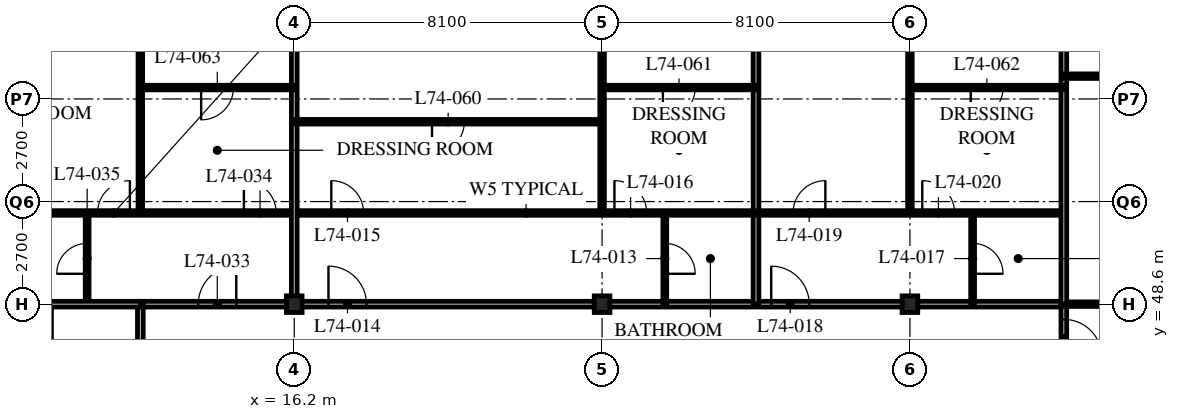
"""IFC4 building model, lengths in metres.
Left out: names, types, materials, properties, quantities, classifications, styles, units other than length and angle.
Written with IfcOpenShell. Run it as: python <this file> out.ifc"""

import sys

from ifc_helpers import new_model, si_unit, direction, frame, frame_2d, origin, origin_2d, place, context, subcontext, project, spatial, rectangle, i_section, extrude, element, fill, save


model = new_model("IFC4")
c1 = context("Model", 3, precision=1e-05, world=origin(), true_north=direction((0.0, 1.0)))
c2 = subcontext(c1, "Body", "Model", "MODEL_VIEW")
j1 = project(units=[si_unit("LENGTHUNIT", "METRE"), si_unit("PLANEANGLEUNIT", "RADIAN")], contexts=[c1])
p1 = place(None, origin())
s1 = spatial("IfcSite", under=j1, at=p1, CompositionType="ELEMENT")
p2 = place(p1, origin())
s2 = spatial("IfcBuilding", under=s1, at=p2, CompositionType="ELEMENT")
p3 = place(p2, frame((0.0, 0.0, 289.2)))
s3 = spatial("IfcBuildingStorey", under=s2, at=p3, CompositionType="ELEMENT", Elevation=289.2)
for number, where, z_axis, x_axis in (
    (1, (16.2, 48.6, 0.0), (0.0, 0.0, 1.0), (1.0, 0.0, 0.0)),
    (2, (24.3, 48.6, 0.0), (0.0, 0.0, 1.0), (1.0, 0.0, 0.0)),
    (3, (32.4, 48.6, 0.0), (0.0, 0.0, 1.0), (1.0, 0.0, 0.0)),
):
    element("IfcColumn", number, at=place(p3, frame(where, z_axis=z_axis, x_axis=x_axis)), inside=s3, PredefinedType="COLUMN", context=c2, shape_type="SweptSolid", body=[
        extrude(i_section(OverallWidth=0.412, OverallDepth=0.437, WebThickness=0.036, FlangeThickness=0.058, FilletRadius=0.015, at=origin_2d()), origin(), (0.0, 0.0, 1.0), 3.9),
    ])
p4 = place(p3, frame((12.15, 48.6, 0.0), z_axis=(0.0, 0.0, 1.0), x_axis=(1.0, 0.0, 0.0)))
e4 = element("IfcWall", 4, at=p4, inside=s3, PredefinedType="PARTITIONING", context=c2, shape_type="SweptSolid", body=[
    extrude(rectangle(XDim=24.3, YDim=0.15, at=frame_2d((12.15, 0.0))), origin(), (0.0, 0.0, 1.0), 3.078),
])
p5 = place(p4, frame((4.95, 0.0, 0.0)))
e5 = element("IfcOpeningElement", 5, at=p5, cuts=e4, PredefinedType="OPENING", context=c2, shape_type="SweptSolid", body=[
    extrude(rectangle(XDim=1.0, YDim=2.1, at=frame_2d((0.5, 1.05))), frame((0.0, 0.085, 0.0), z_axis=(0.0, -1.0, 0.0), x_axis=(1.0, 0.0, 0.0)), (0.0, 0.0, 1.0), 0.17),
])
p6 = place(p4, frame((16.6, 0.0, 0.0)))
e6 = element("IfcOpeningElement", 6, at=p6, cuts=e4, PredefinedType="OPENING", context=c2, shape_type="SweptSolid", body=[
    extrude(rectangle(XDim=1.0, YDim=2.1, at=frame_2d((0.5, 1.05))), frame((0.0, 0.085, 0.0), z_axis=(0.0, -1.0, 0.0), x_axis=(1.0, 0.0, 0.0)), (0.0, 0.0, 1.0), 0.17),
])
p7 = place(p4, frame((1.525, 0.0, 0.0)))
e7 = element("IfcOpeningElement", 7, at=p7, cuts=e4, PredefinedType="OPENING", context=c2, shape_type="SweptSolid", body=[
    extrude(rectangle(XDim=1.0, YDim=2.1, at=frame_2d((0.5, 1.05))), frame((0.0, 0.085, 0.0), z_axis=(0.0, -1.0, 0.0), x_axis=(1.0, 0.0, 0.0)), (0.0, 0.0, 1.0), 0.17),
])
p8 = place(p3, frame((12.15, 22.5, 0.0), z_axis=(0.0, 0.0, 1.0), x_axis=(0.0, 1.0, 0.0)))
e8 = element("IfcWall", 8, at=p8, inside=s3, PredefinedType="PARTITIONING", context=c2, shape_type="SweptSolid", body=[
    extrude(rectangle(XDim=26.1, YDim=0.15, at=frame_2d((13.05, 0.0))), origin(), (0.0, 0.0, 1.0), 3.69),
])
p9 = place(p8, frame((0.4, 0.0, 0.0)))
e9 = element("IfcOpeningElement", 9, at=p9, cuts=e8, PredefinedType="OPENING", context=c2, shape_type="SweptSolid", body=[
    extrude(rectangle(XDim=1.0, YDim=2.1, at=frame_2d((0.5, 1.05))), frame((0.0, 0.085, 0.0), z_axis=(0.0, -1.0, 0.0), x_axis=(1.0, 0.0, 0.0)), (0.0, 0.0, 1.0), 0.17),
])
p10 = place(p3, frame((36.45, 46.8, 0.0), z_axis=(0.0, 0.0, 1.0), x_axis=(0.0, 1.0, 0.0)))
e10 = element("IfcWall", 10, at=p10, inside=s3, PredefinedType="PARTITIONING", context=c2, shape_type="SweptSolid", body=[
    extrude(rectangle(XDim=1.8, YDim=0.15, at=frame_2d((0.9, 0.0))), origin(), (0.0, 0.0, 1.0), 3.69),
])
p11 = place(p10, frame((0.4, 0.0, 0.0)))
e11 = element("IfcOpeningElement", 11, at=p11, cuts=e10, PredefinedType="OPENING", context=c2, shape_type="SweptSolid", body=[
    extrude(rectangle(XDim=1.0, YDim=2.1, at=frame_2d((0.5, 1.05))), frame((0.0, 0.085, 0.0), z_axis=(0.0, -1.0, 0.0), x_axis=(1.0, 0.0, 0.0)), (0.0, 0.0, 1.0), 0.17),
])
p12 = place(p3, frame((25.95, 48.6, 0.0), z_axis=(0.0, 0.0, 1.0), x_axis=(0.0, 1.0, 0.0)))
e12 = element("IfcWall", 12, at=p12, inside=s3, PredefinedType="PARTITIONING", context=c2, shape_type="SweptSolid", body=[
    extrude(rectangle(XDim=2.4, YDim=0.1, at=frame_2d((1.2, 0.0))), origin(), (0.0, 0.0, 1.0), 3.69),
])
p13 = place(p12, frame((0.8, 0.0, 0.0)))
e13 = element("IfcOpeningElement", 13, at=p13, cuts=e12, PredefinedType="OPENING", context=c2, shape_type="SweptSolid", body=[
    extrude(rectangle(XDim=0.8, YDim=2.1, at=frame_2d((0.4, 1.05))), frame((0.0, 0.06, 0.0), z_axis=(0.0, -1.0, 0.0), x_axis=(1.0, 0.0, 0.0)), (0.0, 0.0, 1.0), 0.12),
])
p14 = place(p3, frame((24.3, 51.0, 0.0), z_axis=(0.0, 0.0, 1.0), x_axis=(0.0, 1.0, 0.0)))
e14 = element("IfcWall", 14, at=p14, inside=s3, PredefinedType="PARTITIONING", context=c2, shape_type="SweptSolid", body=[
    extrude(rectangle(XDim=13.5, YDim=0.12, at=frame_2d((6.75, 0.0))), origin(), (0.0, 0.0, 1.0), 3.078),
])
p15 = place(p3, frame((28.35, 48.6, 0.0), z_axis=(0.0, 0.0, 1.0), x_axis=(0.0, 1.0, 0.0)))
e15 = element("IfcWall", 15, at=p15, inside=s3, PredefinedType="PARTITIONING", context=c2, shape_type="SweptSolid", body=[
    extrude(rectangle(XDim=15.9, YDim=0.15, at=frame_2d((7.95, 0.0))), origin(), (0.0, 0.0, 1.0), 3.69),
])
p16 = place(p3, frame((34.05, 48.6, 0.0), z_axis=(0.0, 0.0, 1.0), x_axis=(0.0, 1.0, 0.0)))
e16 = element("IfcWall", 16, at=p16, inside=s3, PredefinedType="PARTITIONING", context=c2, shape_type="SweptSolid", body=[
    extrude(rectangle(XDim=2.4, YDim=0.1, at=frame_2d((1.2, 0.0))), origin(), (0.0, 0.0, 1.0), 3.69),
])
p17 = place(p16, frame((0.8, 0.0, 0.0)))
e17 = element("IfcOpeningElement", 17, at=p17, cuts=e16, PredefinedType="OPENING", context=c2, shape_type="SweptSolid", body=[
    extrude(rectangle(XDim=0.8, YDim=2.1, at=frame_2d((0.4, 1.05))), frame((0.0, 0.06, 0.0), z_axis=(0.0, -1.0, 0.0), x_axis=(1.0, 0.0, 0.0)), (0.0, 0.0, 1.0), 0.12),
])
p18 = place(p3, frame((32.4, 51.0, 0.0), z_axis=(0.0, 0.0, 1.0), x_axis=(0.0, 1.0, 0.0)))
e18 = element("IfcWall", 18, at=p18, inside=s3, PredefinedType="PARTITIONING", context=c2, shape_type="SweptSolid", body=[
    extrude(rectangle(XDim=13.5, YDim=0.12, at=frame_2d((6.75, 0.0))), origin(), (0.0, 0.0, 1.0), 3.078),
])
p19 = place(p3, frame((10.75, 48.6, 0.0), z_axis=(0.0, 0.0, 1.0), x_axis=(0.0, 1.0, 0.0)))
e19 = element("IfcWall", 19, at=p19, inside=s3, PredefinedType="PARTITIONING", context=c2, shape_type="SweptSolid", body=[
    extrude(rectangle(XDim=2.4, YDim=0.1, at=frame_2d((1.2, 0.0))), origin(), (0.0, 0.0, 1.0), 3.69),
])
p20 = place(p19, frame((0.8, 0.0, 0.0)))
e20 = element("IfcOpeningElement", 20, at=p20, cuts=e19, PredefinedType="OPENING", context=c2, shape_type="SweptSolid", body=[
    extrude(rectangle(XDim=0.8, YDim=2.1, at=frame_2d((0.4, 1.05))), frame((0.0, 0.06, 0.0), z_axis=(0.0, -1.0, 0.0), x_axis=(1.0, 0.0, 0.0)), (0.0, 0.0, 1.0), 0.12),
])
p21 = place(p3, frame((8.15, 51.0, 0.0), z_axis=(0.0, 0.0, 1.0), x_axis=(1.0, 0.0, 0.0)))
e21 = element("IfcWall", 21, at=p21, inside=s3, PredefinedType="PARTITIONING", context=c2, shape_type="SweptSolid", body=[
    extrude(rectangle(XDim=28.3, YDim=0.12, at=frame_2d((14.15, 0.0))), origin(), (0.0, 0.0, 1.0), 3.69),
])
p22 = place(p21, frame((9.025, 0.0, 0.0)))
e22 = element("IfcOpeningElement", 22, at=p22, cuts=e21, PredefinedType="OPENING", context=c2, shape_type="SweptSolid", body=[
    extrude(rectangle(XDim=0.85, YDim=2.1, at=frame_2d((0.425, 1.05))), frame((0.0, 0.07, 0.0), z_axis=(0.0, -1.0, 0.0), x_axis=(1.0, 0.0, 0.0)), (0.0, 0.0, 1.0), 0.14),
])
p23 = place(p21, frame((16.475, 0.0, 0.0)))
e23 = element("IfcOpeningElement", 23, at=p23, cuts=e21, PredefinedType="OPENING", context=c2, shape_type="SweptSolid", body=[
    extrude(rectangle(XDim=0.85, YDim=2.1, at=frame_2d((0.425, 1.05))), frame((0.0, 0.07, 0.0), z_axis=(0.0, -1.0, 0.0), x_axis=(1.0, 0.0, 0.0)), (0.0, 0.0, 1.0), 0.14),
])
p24 = place(p21, frame((21.175, 0.0, 0.0)))
e24 = element("IfcOpeningElement", 24, at=p24, cuts=e21, PredefinedType="OPENING", context=c2, shape_type="SweptSolid", body=[
    extrude(rectangle(XDim=0.85, YDim=2.1, at=frame_2d((0.425, 1.05))), frame((0.0, 0.07, 0.0), z_axis=(0.0, -1.0, 0.0), x_axis=(1.0, 0.0, 0.0)), (0.0, 0.0, 1.0), 0.14),
])
p25 = place(p21, frame((24.575, 0.0, 0.0)))
e25 = element("IfcOpeningElement", 25, at=p25, cuts=e21, PredefinedType="OPENING", context=c2, shape_type="SweptSolid", body=[
    extrude(rectangle(XDim=0.85, YDim=2.1, at=frame_2d((0.425, 1.05))), frame((0.0, 0.07, 0.0), z_axis=(0.0, -1.0, 0.0), x_axis=(1.0, 0.0, 0.0)), (0.0, 0.0, 1.0), 0.14),
])
p26 = place(p21, frame((6.725, 0.0, 0.0)))
e26 = element("IfcOpeningElement", 26, at=p26, cuts=e21, PredefinedType="OPENING", context=c2, shape_type="SweptSolid", body=[
    extrude(rectangle(XDim=0.85, YDim=2.1, at=frame_2d((0.425, 1.05))), frame((0.0, 0.07, 0.0), z_axis=(0.0, -1.0, 0.0), x_axis=(1.0, 0.0, 0.0)), (0.0, 0.0, 1.0), 0.14),
])
p27 = place(p21, frame((2.875, 0.0, 0.0)))
e27 = element("IfcOpeningElement", 27, at=p27, cuts=e21, PredefinedType="OPENING", context=c2, shape_type="SweptSolid", body=[
    extrude(rectangle(XDim=0.85, YDim=2.1, at=frame_2d((0.425, 1.05))), frame((0.0, 0.07, 0.0), z_axis=(0.0, -1.0, 0.0), x_axis=(1.0, 0.0, 0.0)), (0.0, 0.0, 1.0), 0.14),
])
p28 = place(p3, frame((12.15, 51.0, 0.0), z_axis=(0.0, 0.0, 1.0), x_axis=(0.0, 1.0, 0.0)))
e28 = element("IfcWall", 28, at=p28, inside=s3, PredefinedType="PARTITIONING", context=c2, shape_type="SweptSolid", body=[
    extrude(rectangle(XDim=13.5, YDim=0.12, at=frame_2d((6.75, 0.0))), origin(), (0.0, 0.0, 1.0), 3.69),
])
p29 = place(p3, frame((0.3, 48.6, 0.0), z_axis=(0.0, 0.0, 1.0), x_axis=(1.0, 0.0, 0.0)))
e29 = element("IfcWall", 29, at=p29, inside=s3, PredefinedType="PARTITIONING", context=c2, shape_type="SweptSolid", body=[
    extrude(rectangle(XDim=11.85, YDim=0.15, at=frame_2d((5.925, 0.0))), origin(), (0.0, 0.0, 1.0), 3.078),
])
p30 = place(p3, frame((16.2, 48.6, 0.0), z_axis=(0.0, 0.0, 1.0), x_axis=(0.0, 1.0, 0.0)))
e30 = element("IfcWall", 30, at=p30, inside=s3, PredefinedType="PARTITIONING", context=c2, shape_type="SweptSolid", body=[
    extrude(rectangle(XDim=15.9, YDim=0.15, at=frame_2d((7.95, 0.0))), origin(), (0.0, 0.0, 1.0), 3.078),
])
p31 = place(p3, frame((36.45, 48.6, 0.0), z_axis=(0.0, 0.0, 1.0), x_axis=(1.0, 0.0, 0.0)))
e31 = element("IfcWall", 31, at=p31, inside=s3, PredefinedType="PARTITIONING", context=c2, shape_type="SweptSolid", body=[
    extrude(rectangle(XDim=6.45, YDim=0.12, at=frame_2d((3.225, 0.0))), origin(), (0.0, 0.0, 1.0), 3.078),
])
p32 = place(p31, frame((2.3, 0.0, 0.0)))
e32 = element("IfcOpeningElement", 32, at=p32, cuts=e31, PredefinedType="OPENING", context=c2, shape_type="SweptSolid", body=[
    extrude(rectangle(XDim=0.85, YDim=2.1, at=frame_2d((0.425, 1.05))), frame((0.0, 0.07, 0.0), z_axis=(0.0, -1.0, 0.0), x_axis=(1.0, 0.0, 0.0)), (0.0, 0.0, 1.0), 0.14),
])
p33 = place(p3, frame((36.45, 64.5, 0.0), z_axis=(0.0, 0.0, 1.0), x_axis=(0.0, -1.0, 0.0)))
e33 = element("IfcWall", 33, at=p33, inside=s3, PredefinedType="PARTITIONING", context=c2, shape_type="SweptSolid", body=[
    extrude(rectangle(XDim=15.9, YDim=0.15, at=frame_2d((7.95, 0.0))), origin(), (0.0, 0.0, 1.0), 3.69),
])
p34 = place(p3, frame((36.45, 54.6, 0.0), z_axis=(0.0, 0.0, 1.0), x_axis=(1.0, 0.0, 0.0)))
e34 = element("IfcWall", 34, at=p34, inside=s3, PredefinedType="PARTITIONING", context=c2, shape_type="SweptSolid", body=[
    extrude(rectangle(XDim=19.95, YDim=0.12, at=frame_2d((9.975, 0.0))), origin(), (0.0, 0.0, 1.0), 3.69),
])
p35 = place(p34, frame((1.675, 0.0, 0.0)))
e35 = element("IfcOpeningElement", 35, at=p35, cuts=e34, PredefinedType="OPENING", context=c2, shape_type="SweptSolid", body=[
    extrude(rectangle(XDim=0.85, YDim=2.1, at=frame_2d((0.425, 1.05))), frame((0.0, 0.07, 0.0), z_axis=(0.0, -1.0, 0.0), x_axis=(1.0, 0.0, 0.0)), (0.0, 0.0, 1.0), 0.14),
])
p36 = place(p3, frame((16.2, 53.4, 0.0), z_axis=(0.0, 0.0, 1.0), x_axis=(1.0, 0.0, 0.0)))
e36 = element("IfcWall", 36, at=p36, inside=s3, PredefinedType="PARTITIONING", context=c2, shape_type="SweptSolid", body=[
    extrude(rectangle(XDim=8.1, YDim=0.12, at=frame_2d((4.05, 0.0))), origin(), (0.0, 0.0, 1.0), 3.69),
])
p37 = place(p36, frame((3.625, 0.0, 0.0)))
e37 = element("IfcOpeningElement", 37, at=p37, cuts=e36, PredefinedType="OPENING", context=c2, shape_type="SweptSolid", body=[
    extrude(rectangle(XDim=0.85, YDim=2.1, at=frame_2d((0.425, 1.05))), frame((0.0, 0.07, 0.0), z_axis=(0.0, -1.0, 0.0), x_axis=(1.0, 0.0, 0.0)), (0.0, 0.0, 1.0), 0.14),
])
p38 = place(p3, frame((24.3, 54.3, 0.0), z_axis=(0.0, 0.0, 1.0), x_axis=(1.0, 0.0, 0.0)))
e38 = element("IfcWall", 38, at=p38, inside=s3, PredefinedType="PARTITIONING", context=c2, shape_type="SweptSolid", body=[
    extrude(rectangle(XDim=4.05, YDim=0.12, at=frame_2d((2.025, 0.0))), origin(), (0.0, 0.0, 1.0), 3.69),
])
p39 = place(p38, frame((1.6, 0.0, 0.0)))
e39 = element("IfcOpeningElement", 39, at=p39, cuts=e38, PredefinedType="OPENING", context=c2, shape_type="SweptSolid", body=[
    extrude(rectangle(XDim=0.85, YDim=2.1, at=frame_2d((0.425, 1.05))), frame((0.0, 0.07, 0.0), z_axis=(0.0, -1.0, 0.0), x_axis=(1.0, 0.0, 0.0)), (0.0, 0.0, 1.0), 0.14),
])
p40 = place(p3, frame((32.4, 54.3, 0.0), z_axis=(0.0, 0.0, 1.0), x_axis=(1.0, 0.0, 0.0)))
e40 = element("IfcWall", 40, at=p40, inside=s3, PredefinedType="PARTITIONING", context=c2, shape_type="SweptSolid", body=[
    extrude(rectangle(XDim=4.05, YDim=0.12, at=frame_2d((2.025, 0.0))), origin(), (0.0, 0.0, 1.0), 3.69),
])
p41 = place(p40, frame((1.6, 0.0, 0.0)))
e41 = element("IfcOpeningElement", 41, at=p41, cuts=e40, PredefinedType="OPENING", context=c2, shape_type="SweptSolid", body=[
    extrude(rectangle(XDim=0.85, YDim=2.1, at=frame_2d((0.425, 1.05))), frame((0.0, 0.07, 0.0), z_axis=(0.0, -1.0, 0.0), x_axis=(1.0, 0.0, 0.0)), (0.0, 0.0, 1.0), 0.14),
])
p42 = place(p3, frame((12.15, 54.3, 0.0), z_axis=(0.0, 0.0, 1.0), x_axis=(1.0, 0.0, 0.0)))
e42 = element("IfcWall", 42, at=p42, inside=s3, PredefinedType="PARTITIONING", context=c2, shape_type="SweptSolid", body=[
    extrude(rectangle(XDim=4.05, YDim=0.12, at=frame_2d((2.025, 0.0))), origin(), (0.0, 0.0, 1.0), 3.69),
])
p43 = place(p42, frame((1.6, 0.0, 0.0)))
e43 = element("IfcOpeningElement", 43, at=p43, cuts=e42, PredefinedType="OPENING", context=c2, shape_type="SweptSolid", body=[
    extrude(rectangle(XDim=0.85, YDim=2.1, at=frame_2d((0.425, 1.05))), frame((0.0, 0.07, 0.0), z_axis=(0.0, -1.0, 0.0), x_axis=(1.0, 0.0, 0.0)), (0.0, 0.0, 1.0), 0.14),
])
p44 = place(p13, origin())
e44 = element("IfcDoor", 44, at=p44, inside=s3, OperationType="SINGLE_SWING_RIGHT", PredefinedType="DOOR", context=c2, shape_type="SweptSolid", body=[
    extrude(rectangle(XDim=0.8, YDim=2.1, at=frame_2d((0.4, 1.05))), frame((0.0, 0.025, 0.0), z_axis=(0.0, -1.0, 0.0), x_axis=(1.0, 0.0, 0.0)), (0.0, 0.0, 1.0), 0.05),
])
fill(e13, e44)
p45 = place(p5, origin())
e45 = element("IfcDoor", 45, at=p45, inside=s3, OperationType="SINGLE_SWING_LEFT", PredefinedType="DOOR", context=c2, shape_type="SweptSolid", body=[
    extrude(rectangle(XDim=1.0, YDim=2.1, at=frame_2d((0.5, 1.05))), frame((0.0, 0.025, 0.0), z_axis=(0.0, -1.0, 0.0), x_axis=(1.0, 0.0, 0.0)), (0.0, 0.0, 1.0), 0.05),
])
fill(e5, e45)
p46 = place(p22, origin())
e46 = element("IfcDoor", 46, at=p46, inside=s3, OperationType="SINGLE_SWING_LEFT", PredefinedType="DOOR", context=c2, shape_type="SweptSolid", body=[
    extrude(rectangle(XDim=0.85, YDim=2.1, at=frame_2d((0.425, 1.05))), frame((0.0, 0.025, 0.0), z_axis=(0.0, -1.0, 0.0), x_axis=(1.0, 0.0, 0.0)), (0.0, 0.0, 1.0), 0.05),
])
fill(e22, e46)
p47 = place(p23, origin())
e47 = element("IfcDoor", 47, at=p47, inside=s3, OperationType="SINGLE_SWING_LEFT", PredefinedType="DOOR", context=c2, shape_type="SweptSolid", body=[
    extrude(rectangle(XDim=0.85, YDim=2.1, at=frame_2d((0.425, 1.05))), frame((0.0, 0.025, 0.0), z_axis=(0.0, -1.0, 0.0), x_axis=(1.0, 0.0, 0.0)), (0.0, 0.0, 1.0), 0.05),
])
fill(e23, e47)
p48 = place(p17, origin())
e48 = element("IfcDoor", 48, at=p48, inside=s3, OperationType="SINGLE_SWING_RIGHT", PredefinedType="DOOR", context=c2, shape_type="SweptSolid", body=[
    extrude(rectangle(XDim=0.8, YDim=2.1, at=frame_2d((0.4, 1.05))), frame((0.0, 0.025, 0.0), z_axis=(0.0, -1.0, 0.0), x_axis=(1.0, 0.0, 0.0)), (0.0, 0.0, 1.0), 0.05),
])
fill(e17, e48)
p49 = place(p6, origin())
e49 = element("IfcDoor", 49, at=p49, inside=s3, OperationType="SINGLE_SWING_LEFT", PredefinedType="DOOR", context=c2, shape_type="SweptSolid", body=[
    extrude(rectangle(XDim=1.0, YDim=2.1, at=frame_2d((0.5, 1.05))), frame((0.0, 0.025, 0.0), z_axis=(0.0, -1.0, 0.0), x_axis=(1.0, 0.0, 0.0)), (0.0, 0.0, 1.0), 0.05),
])
fill(e6, e49)
p50 = place(p24, origin())
e50 = element("IfcDoor", 50, at=p50, inside=s3, OperationType="SINGLE_SWING_RIGHT", PredefinedType="DOOR", context=c2, shape_type="SweptSolid", body=[
    extrude(rectangle(XDim=0.85, YDim=2.1, at=frame_2d((0.425, 1.05))), frame((0.0, 0.025, 0.0), z_axis=(0.0, -1.0, 0.0), x_axis=(1.0, 0.0, 0.0)), (0.0, 0.0, 1.0), 0.05),
])
fill(e24, e50)
p51 = place(p25, origin())
e51 = element("IfcDoor", 51, at=p51, inside=s3, OperationType="SINGLE_SWING_LEFT", PredefinedType="DOOR", context=c2, shape_type="SweptSolid", body=[
    extrude(rectangle(XDim=0.85, YDim=2.1, at=frame_2d((0.425, 1.05))), frame((0.0, 0.025, 0.0), z_axis=(0.0, -1.0, 0.0), x_axis=(1.0, 0.0, 0.0)), (0.0, 0.0, 1.0), 0.05),
])
fill(e25, e51)
p52 = place(p7, origin())
e52 = element("IfcDoor", 52, at=p52, inside=s3, OperationType="SINGLE_SWING_RIGHT", PredefinedType="DOOR", context=c2, shape_type="SweptSolid", body=[
    extrude(rectangle(XDim=1.0, YDim=2.1, at=frame_2d((0.5, 1.05))), frame((0.0, 0.025, 0.0), z_axis=(0.0, -1.0, 0.0), x_axis=(1.0, 0.0, 0.0)), (0.0, 0.0, 1.0), 0.05),
])
fill(e7, e52)
p53 = place(p26, origin())
e53 = element("IfcDoor", 53, at=p53, inside=s3, OperationType="SINGLE_SWING_LEFT", PredefinedType="DOOR", context=c2, shape_type="SweptSolid", body=[
    extrude(rectangle(XDim=0.85, YDim=2.1, at=frame_2d((0.425, 1.05))), frame((0.0, 0.025, 0.0), z_axis=(0.0, -1.0, 0.0), x_axis=(1.0, 0.0, 0.0)), (0.0, 0.0, 1.0), 0.05),
])
fill(e26, e53)
p54 = place(p20, origin())
e54 = element("IfcDoor", 54, at=p54, inside=s3, OperationType="SINGLE_SWING_LEFT", PredefinedType="DOOR", context=c2, shape_type="SweptSolid", body=[
    extrude(rectangle(XDim=0.8, YDim=2.1, at=frame_2d((0.4, 1.05))), frame((0.0, 0.025, 0.0), z_axis=(0.0, -1.0, 0.0), x_axis=(1.0, 0.0, 0.0)), (0.0, 0.0, 1.0), 0.05),
])
fill(e20, e54)
p55 = place(p27, origin())
e55 = element("IfcDoor", 55, at=p55, inside=s3, OperationType="SINGLE_SWING_RIGHT", PredefinedType="DOOR", context=c2, shape_type="SweptSolid", body=[
    extrude(rectangle(XDim=0.85, YDim=2.1, at=frame_2d((0.425, 1.05))), frame((0.0, 0.025, 0.0), z_axis=(0.0, -1.0, 0.0), x_axis=(1.0, 0.0, 0.0)), (0.0, 0.0, 1.0), 0.05),
])
fill(e27, e55)
p56 = place(p11, origin())
e56 = element("IfcDoor", 56, at=p56, inside=s3, OperationType="SINGLE_SWING_RIGHT", PredefinedType="DOOR", context=c2, shape_type="SweptSolid", body=[
    extrude(rectangle(XDim=1.0, YDim=2.1, at=frame_2d((0.5, 1.05))), frame((0.0, 0.025, 0.0), z_axis=(0.0, -1.0, 0.0), x_axis=(1.0, 0.0, 0.0)), (0.0, 0.0, 1.0), 0.05),
])
fill(e11, e56)
p57 = place(p37, origin())
e57 = element("IfcDoor", 57, at=p57, inside=s3, OperationType="SINGLE_SWING_RIGHT", PredefinedType="DOOR", context=c2, shape_type="SweptSolid", body=[
    extrude(rectangle(XDim=0.85, YDim=2.1, at=frame_2d((0.425, 1.05))), frame((0.0, 0.025, 0.0), z_axis=(0.0, -1.0, 0.0), x_axis=(1.0, 0.0, 0.0)), (0.0, 0.0, 1.0), 0.05),
])
fill(e37, e57)
p58 = place(p39, origin())
e58 = element("IfcDoor", 58, at=p58, inside=s3, OperationType="SINGLE_SWING_RIGHT", PredefinedType="DOOR", context=c2, shape_type="SweptSolid", body=[
    extrude(rectangle(XDim=0.85, YDim=2.1, at=frame_2d((0.425, 1.05))), frame((0.0, 0.025, 0.0), z_axis=(0.0, -1.0, 0.0), x_axis=(1.0, 0.0, 0.0)), (0.0, 0.0, 1.0), 0.05),
])
fill(e39, e58)
p59 = place(p41, origin())
e59 = element("IfcDoor", 59, at=p59, inside=s3, OperationType="SINGLE_SWING_RIGHT", PredefinedType="DOOR", context=c2, shape_type="SweptSolid", body=[
    extrude(rectangle(XDim=0.85, YDim=2.1, at=frame_2d((0.425, 1.05))), frame((0.0, 0.025, 0.0), z_axis=(0.0, -1.0, 0.0), x_axis=(1.0, 0.0, 0.0)), (0.0, 0.0, 1.0), 0.05),
])
fill(e41, e59)
p60 = place(p43, origin())
e60 = element("IfcDoor", 60, at=p60, inside=s3, OperationType="SINGLE_SWING_RIGHT", PredefinedType="DOOR", context=c2, shape_type="SweptSolid", body=[
    extrude(rectangle(XDim=0.85, YDim=2.1, at=frame_2d((0.425, 1.05))), frame((0.0, 0.025, 0.0), z_axis=(0.0, -1.0, 0.0), x_axis=(1.0, 0.0, 0.0)), (0.0, 0.0, 1.0), 0.05),
])
fill(e43, e60)
save(model, sys.argv[1])
